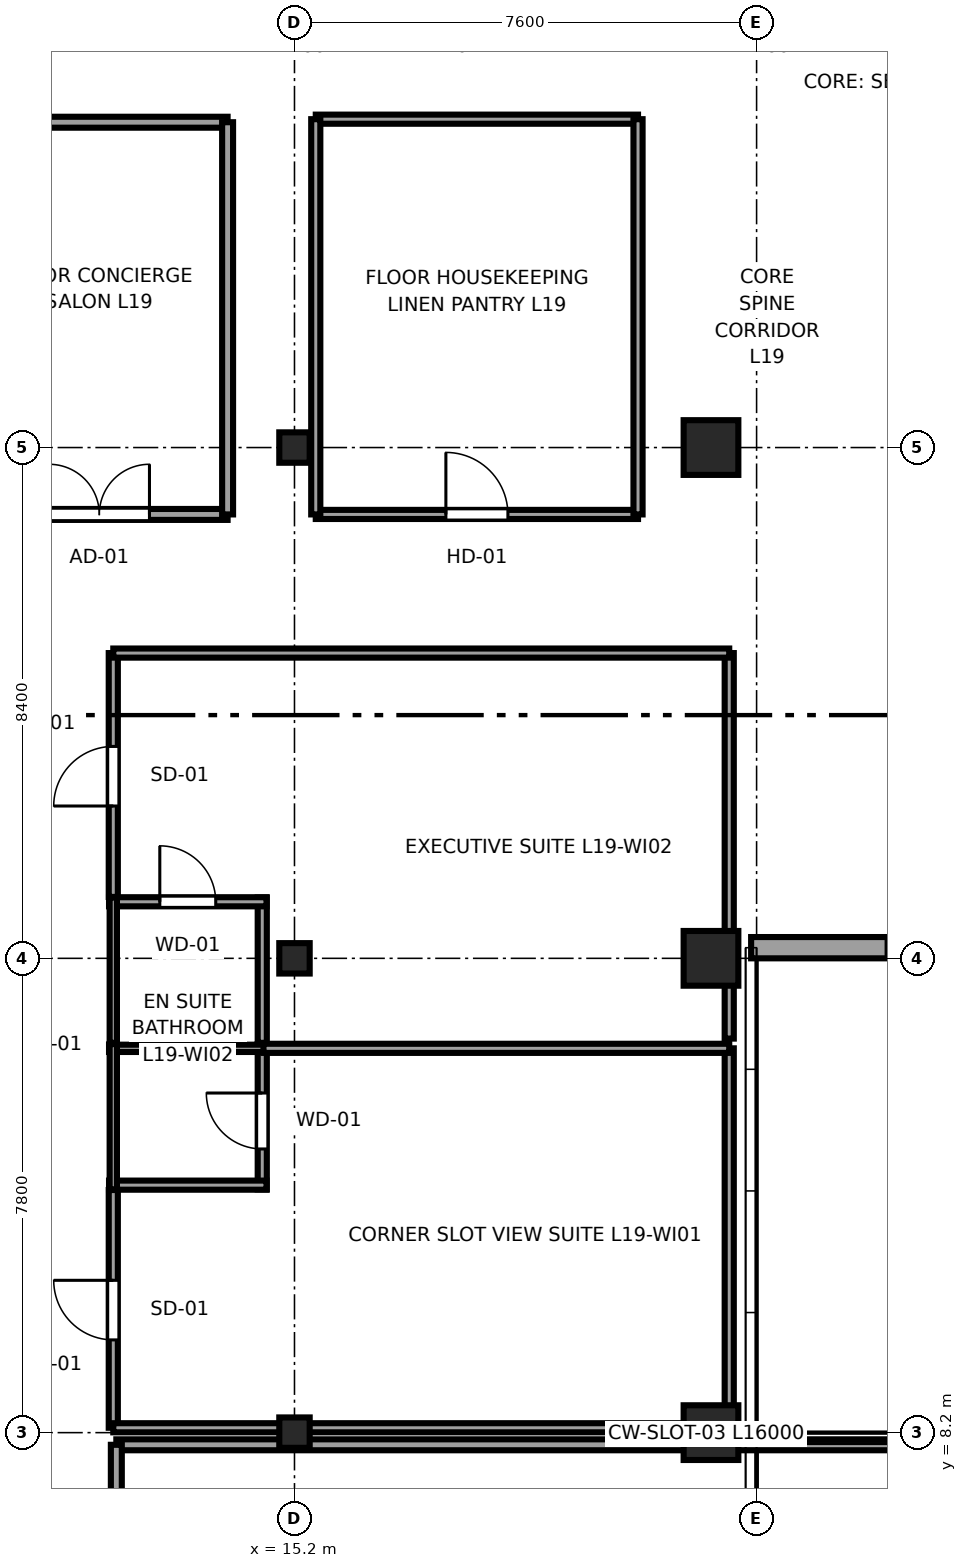
"""IFC4 building model, lengths in metres.
Left out: names, types, materials, properties, quantities, classifications, styles, units other than length and angle.
Written with IfcOpenShell. Run it as: python <this file> out.ifc"""

import sys

from ifc_helpers import new_model, si_unit, direction, frame, frame_2d, origin, origin_2d, place, context, subcontext, project, spatial, rectangle, i_section, extrude, source, transform, mapped, element, fill, save


model = new_model("IFC4")
c1 = context("Model", 3, precision=1e-05, world=origin(), true_north=direction((0.0, 1.0)))
c2 = subcontext(c1, "Body", "Model", "MODEL_VIEW")
j1 = project(units=[si_unit("LENGTHUNIT", "METRE"), si_unit("PLANEANGLEUNIT", "RADIAN")], contexts=[c1])
p1 = place(None, origin())
s1 = spatial("IfcSite", under=j1, at=p1, CompositionType="ELEMENT")
p2 = place(p1, origin())
s2 = spatial("IfcBuilding", under=s1, at=p2, CompositionType="ELEMENT")
p3 = place(p2, frame((0.0, 0.0, 78.15)))
s3 = spatial("IfcBuildingStorey", under=s2, at=p3, CompositionType="ELEMENT", Elevation=78.15)
m1 = source(origin(), c2, "Body", "SweptSolid", [
    extrude(i_section(OverallWidth=0.5, OverallDepth=0.5, WebThickness=0.022, FlangeThickness=0.034, at=origin_2d()), origin(), (0.0, 0.0, 1.0), 3.55),
])
for number, where, z_axis, x_axis in (
    (1, (15.2, 8.2, 0.0), (0.0, 0.0, 1.0), (1.0, 0.0, 0.0)),
    (2, (15.2, 16.0, 0.0), (0.0, 0.0, 1.0), (1.0, 0.0, 0.0)),
    (3, (15.2, 24.4, 0.0), (0.0, 0.0, 1.0), (1.0, 0.0, 0.0)),
):
    element("IfcColumn", number, at=place(p3, frame(where, z_axis=z_axis, x_axis=x_axis)), inside=s3, PredefinedType="COLUMN", context=c2, shape_type="MappedRepresentation", body=[
        mapped(m1, transform((0.0, 0.0, 0.0), x_axis=(1.0, 0.0, 0.0), y_axis=(0.0, 1.0, 0.0), z_axis=(0.0, 0.0, 1.0), scale=1.0)),
    ])
m2 = source(origin(), c2, "Body", "SweptSolid", [
    extrude(rectangle(XDim=0.9, YDim=0.9, at=origin_2d()), origin(), (0.0, 0.0, 1.0), 3.55),
])
for number, where, z_axis, x_axis in (
    (4, (22.05, 8.2, 0.0), (0.0, 0.0, 1.0), (1.0, 0.0, 0.0)),
    (5, (22.05, 16.0, 0.0), (0.0, 0.0, 1.0), (1.0, 0.0, 0.0)),
    (6, (22.05, 24.4, 0.0), (0.0, 0.0, 1.0), (1.0, 0.0, 0.0)),
):
    element("IfcColumn", number, at=place(p3, frame(where, z_axis=z_axis, x_axis=x_axis)), inside=s3, PredefinedType="COLUMN", context=c2, shape_type="MappedRepresentation", body=[
        mapped(m2, transform((0.0, 0.0, 0.0), x_axis=(1.0, 0.0, 0.0), y_axis=(0.0, 1.0, 0.0), z_axis=(0.0, 0.0, 1.0), scale=1.0)),
    ])
p4 = place(p3, frame((22.71, 16.175, 0.0), z_axis=(0.0, 0.0, 1.0), x_axis=(1.0, 0.0, 0.0)))
e7 = element("IfcWall", 7, at=p4, inside=s3, PredefinedType="SOLIDWALL", context=c2, shape_type="SweptSolid", body=[
    extrude(rectangle(XDim=11.58, YDim=0.35, at=frame_2d((5.79, 0.0))), origin(), (0.0, 0.0, 1.0), 2.748),
])
p5 = place(p4, frame((2.22, 0.0, 0.68)))
e8 = element("IfcOpeningElement", 8, at=p5, cuts=e7, PredefinedType="OPENING", context=c2, shape_type="SweptSolid", body=[
    extrude(rectangle(XDim=1.95, YDim=1.82, at=frame_2d((0.975, 0.91))), frame((0.0, 0.185, 0.0), z_axis=(0.0, -1.0, 0.0), x_axis=(1.0, 0.0, 0.0)), (0.0, 0.0, 1.0), 0.37),
])
p6 = place(p4, frame((7.41, 0.0, 0.68)))
e9 = element("IfcOpeningElement", 9, at=p6, cuts=e7, PredefinedType="OPENING", context=c2, shape_type="SweptSolid", body=[
    extrude(rectangle(XDim=1.95, YDim=1.82, at=frame_2d((0.975, 0.91))), frame((0.0, 0.185, 0.0), z_axis=(0.0, -1.0, 0.0), x_axis=(1.0, 0.0, 0.0)), (0.0, 0.0, 1.0), 0.37),
])
p7 = place(p3, frame((14.67, 12.2, 0.0), z_axis=(0.0, 0.0, 1.0), x_axis=(0.0, 1.0, 0.0)))
e10 = element("IfcWall", 10, at=p7, inside=s3, PredefinedType="PARTITIONING", context=c2, shape_type="SweptSolid", body=[
    extrude(rectangle(XDim=2.39, YDim=0.15, at=frame_2d((1.195, 0.0))), origin(), (0.0, 0.0, 1.0), 3.37),
])
p8 = place(p7, frame((0.665, 0.0, 0.0)))
e11 = element("IfcOpeningElement", 11, at=p8, cuts=e10, PredefinedType="OPENING", context=c2, shape_type="SweptSolid", body=[
    extrude(rectangle(XDim=0.92, YDim=2.01, at=frame_2d((0.46, 1.005))), frame((0.0, 0.085, 0.0), z_axis=(0.0, -1.0, 0.0), x_axis=(1.0, 0.0, 0.0)), (0.0, 0.0, 1.0), 0.17),
])
p9 = place(p3, frame((12.15, 12.27, 0.0), z_axis=(0.0, 0.0, 1.0), x_axis=(1.0, 0.0, 0.0)))
e12 = element("IfcWall", 12, at=p9, inside=s3, PredefinedType="PARTITIONING", context=c2, shape_type="SweptSolid", body=[
    extrude(rectangle(XDim=2.59, YDim=0.15, at=frame_2d((1.295, 0.0))), origin(), (0.0, 0.0, 1.0), 3.37),
])
p10 = place(p3, frame((12.15, 14.52, 0.0), z_axis=(0.0, 0.0, 1.0), x_axis=(1.0, 0.0, 0.0)))
e13 = element("IfcWall", 13, at=p10, inside=s3, PredefinedType="PLUMBINGWALL", context=c2, shape_type="SweptSolid", body=[
    extrude(rectangle(XDim=2.59, YDim=0.12, at=frame_2d((1.295, 0.0))), origin(), (0.0, 0.0, 1.0), 3.37),
])
p11 = place(p3, frame((12.22, 12.2, 0.0), z_axis=(0.0, 0.0, 1.0), x_axis=(0.0, 1.0, 0.0)))
e14 = element("IfcWall", 14, at=p11, inside=s3, PredefinedType="PLUMBINGWALL", context=c2, shape_type="SweptSolid", body=[
    extrude(rectangle(XDim=2.39, YDim=0.12, at=frame_2d((1.195, 0.0))), origin(), (0.0, 0.0, 1.0), 3.37),
])
p12 = place(p3, frame((14.67, 14.61, 0.0), z_axis=(0.0, 0.0, 1.0), x_axis=(0.0, 1.0, 0.0)))
e15 = element("IfcWall", 15, at=p12, inside=s3, PredefinedType="PARTITIONING", context=c2, shape_type="SweptSolid", body=[
    extrude(rectangle(XDim=2.39, YDim=0.15, at=frame_2d((1.195, 0.0))), origin(), (0.0, 0.0, 1.0), 3.37),
])
p13 = place(p3, frame((12.15, 16.93, 0.0), z_axis=(0.0, 0.0, 1.0), x_axis=(1.0, 0.0, 0.0)))
e16 = element("IfcWall", 16, at=p13, inside=s3, PredefinedType="PARTITIONING", context=c2, shape_type="SweptSolid", body=[
    extrude(rectangle(XDim=2.59, YDim=0.15, at=frame_2d((1.295, 0.0))), origin(), (0.0, 0.0, 1.0), 3.37),
])
p14 = place(p13, frame((0.835, 0.0, 0.0)))
e17 = element("IfcOpeningElement", 17, at=p14, cuts=e16, PredefinedType="OPENING", context=c2, shape_type="SweptSolid", body=[
    extrude(rectangle(XDim=0.92, YDim=2.01, at=frame_2d((0.46, 1.005))), frame((0.0, 0.085, 0.0), z_axis=(0.0, -1.0, 0.0), x_axis=(1.0, 0.0, 0.0)), (0.0, 0.0, 1.0), 0.17),
])
p15 = place(p3, frame((12.22, 14.61, 0.0), z_axis=(0.0, 0.0, 1.0), x_axis=(0.0, 1.0, 0.0)))
e18 = element("IfcWall", 18, at=p15, inside=s3, PredefinedType="PLUMBINGWALL", context=c2, shape_type="SweptSolid", body=[
    extrude(rectangle(XDim=2.39, YDim=0.12, at=frame_2d((1.195, 0.0))), origin(), (0.0, 0.0, 1.0), 3.37),
])
p16 = place(p3, frame((12.22, 8.28, 0.0), z_axis=(0.0, 0.0, 1.0), x_axis=(0.0, 1.0, 0.0)))
e19 = element("IfcWall", 19, at=p16, inside=s3, PredefinedType="PARTITIONING", context=c2, shape_type="SweptSolid", body=[
    extrude(rectangle(XDim=3.91, YDim=0.15, at=frame_2d((1.955, 0.0))), origin(), (0.0, 0.0, 1.0), 3.37),
])
p17 = place(p16, frame((1.445, 0.0, 0.0)))
e20 = element("IfcOpeningElement", 20, at=p17, cuts=e19, PredefinedType="OPENING", context=c2, shape_type="SweptSolid", body=[
    extrude(rectangle(XDim=0.98, YDim=2.12, at=frame_2d((0.49, 1.06))), frame((0.0, 0.085, 0.0), z_axis=(0.0, -1.0, 0.0), x_axis=(1.0, 0.0, 0.0)), (0.0, 0.0, 1.0), 0.17),
])
p18 = place(p3, frame((12.22, 8.28, 0.0), z_axis=(0.0, 0.0, 1.0), x_axis=(1.0, 0.0, 0.0)))
e21 = element("IfcWall", 21, at=p18, inside=s3, PredefinedType="PARTITIONING", context=c2, shape_type="SweptSolid", body=[
    extrude(rectangle(XDim=10.13, YDim=0.15, at=frame_2d((5.065, 0.0))), origin(), (0.0, 0.0, 1.0), 2.748),
])
p19 = place(p3, frame((22.35, 8.28, 0.0), z_axis=(0.0, 0.0, 1.0), x_axis=(0.0, 1.0, 0.0)))
e22 = element("IfcWall", 22, at=p19, inside=s3, PredefinedType="PARTITIONING", context=c2, shape_type="SweptSolid", body=[
    extrude(rectangle(XDim=6.24, YDim=0.15, at=frame_2d((3.12, 0.0))), origin(), (0.0, 0.0, 1.0), 3.37),
])
p20 = place(p3, frame((14.69, 14.52, 0.0), z_axis=(0.0, 0.0, 1.0), x_axis=(1.0, 0.0, 0.0)))
e23 = element("IfcWall", 23, at=p20, inside=s3, PredefinedType="PARTITIONING", context=c2, shape_type="SweptSolid", body=[
    extrude(rectangle(XDim=7.66, YDim=0.15, at=frame_2d((3.83, 0.0))), origin(), (0.0, 0.0, 1.0), 3.37),
])
p21 = place(p3, frame((12.22, 17.01, 0.0), z_axis=(0.0, 0.0, 1.0), x_axis=(0.0, 1.0, 0.0)))
e24 = element("IfcWall", 24, at=p21, inside=s3, PredefinedType="PARTITIONING", context=c2, shape_type="SweptSolid", body=[
    extrude(rectangle(XDim=4.01, YDim=0.15, at=frame_2d((2.005, 0.0))), origin(), (0.0, 0.0, 1.0), 3.37),
])
p22 = place(p21, frame((1.495, 0.0, 0.0)))
e25 = element("IfcOpeningElement", 25, at=p22, cuts=e24, PredefinedType="OPENING", context=c2, shape_type="SweptSolid", body=[
    extrude(rectangle(XDim=0.98, YDim=2.12, at=frame_2d((0.49, 1.06))), frame((0.0, 0.085, 0.0), z_axis=(0.0, -1.0, 0.0), x_axis=(1.0, 0.0, 0.0)), (0.0, 0.0, 1.0), 0.17),
])
p23 = place(p3, frame((22.35, 14.68, 0.0), z_axis=(0.0, 0.0, 1.0), x_axis=(0.0, 1.0, 0.0)))
e26 = element("IfcWall", 26, at=p23, inside=s3, PredefinedType="PARTITIONING", context=c2, shape_type="SweptSolid", body=[
    extrude(rectangle(XDim=6.34, YDim=0.15, at=frame_2d((3.17, 0.0))), origin(), (0.0, 0.0, 1.0), 3.37),
])
p24 = place(p3, frame((12.22, 21.02, 0.0), z_axis=(0.0, 0.0, 1.0), x_axis=(1.0, 0.0, 0.0)))
e27 = element("IfcWall", 27, at=p24, inside=s3, PredefinedType="PARTITIONING", context=c2, shape_type="SweptSolid", body=[
    extrude(rectangle(XDim=10.13, YDim=0.15, at=frame_2d((5.065, 0.0))), origin(), (0.0, 0.0, 1.0), 3.37),
])
p25 = place(p3, frame((9.88, 23.3, 0.0), z_axis=(0.0, 0.0, 1.0), x_axis=(1.0, 0.0, 0.0)))
e28 = element("IfcWall", 28, at=p25, inside=s3, PredefinedType="PARTITIONING", context=c2, shape_type="SweptSolid", body=[
    extrude(rectangle(XDim=4.22, YDim=0.18, at=frame_2d((2.11, 0.0))), origin(), (0.0, 0.0, 1.0), 3.37),
])
p26 = place(p25, frame((1.285, 0.0, 0.0)))
e29 = element("IfcOpeningElement", 29, at=p26, cuts=e28, PredefinedType="OPENING", context=c2, shape_type="SweptSolid", body=[
    extrude(rectangle(XDim=1.65, YDim=2.15, at=frame_2d((0.825, 1.075))), frame((0.0, 0.1, 0.0), z_axis=(0.0, -1.0, 0.0), x_axis=(1.0, 0.0, 0.0)), (0.0, 0.0, 1.0), 0.2),
])
p27 = place(p3, frame((9.88, 29.75, 0.0), z_axis=(0.0, 0.0, 1.0), x_axis=(1.0, 0.0, 0.0)))
e30 = element("IfcWall", 30, at=p27, inside=s3, PredefinedType="PARTITIONING", context=c2, shape_type="SweptSolid", body=[
    extrude(rectangle(XDim=4.22, YDim=0.18, at=frame_2d((2.11, 0.0))), origin(), (0.0, 0.0, 1.0), 3.37),
])
p28 = place(p3, frame((14.1, 23.3, 0.0), z_axis=(0.0, 0.0, 1.0), x_axis=(0.0, 1.0, 0.0)))
e31 = element("IfcWall", 31, at=p28, inside=s3, PredefinedType="PARTITIONING", context=c2, shape_type="SweptSolid", body=[
    extrude(rectangle(XDim=6.45, YDim=0.18, at=frame_2d((3.225, 0.0))), origin(), (0.0, 0.0, 1.0), 3.37),
])
p29 = place(p3, frame((15.55, 23.3, 0.0), z_axis=(0.0, 0.0, 1.0), x_axis=(1.0, 0.0, 0.0)))
e32 = element("IfcWall", 32, at=p29, inside=s3, PredefinedType="PARTITIONING", context=c2, shape_type="SweptSolid", body=[
    extrude(rectangle(XDim=5.3, YDim=0.15, at=frame_2d((2.65, 0.0))), origin(), (0.0, 0.0, 1.0), 3.37),
])
p30 = place(p29, frame((2.14, 0.0, 0.0)))
e33 = element("IfcOpeningElement", 33, at=p30, cuts=e32, PredefinedType="OPENING", context=c2, shape_type="SweptSolid", body=[
    extrude(rectangle(XDim=1.02, YDim=2.03, at=frame_2d((0.51, 1.015))), frame((0.0, 0.085, 0.0), z_axis=(0.0, -1.0, 0.0), x_axis=(1.0, 0.0, 0.0)), (0.0, 0.0, 1.0), 0.17),
])
p31 = place(p3, frame((15.55, 29.8, 0.0), z_axis=(0.0, 0.0, 1.0), x_axis=(1.0, 0.0, 0.0)))
e34 = element("IfcWall", 34, at=p31, inside=s3, PredefinedType="PARTITIONING", context=c2, shape_type="SweptSolid", body=[
    extrude(rectangle(XDim=5.3, YDim=0.15, at=frame_2d((2.65, 0.0))), origin(), (0.0, 0.0, 1.0), 3.37),
])
for number, where, z_axis, x_axis in (
    (35, (15.55, 23.3, 0.0), (0.0, 0.0, 1.0), (0.0, 1.0, 0.0)),
    (36, (20.85, 23.3, 0.0), (0.0, 0.0, 1.0), (0.0, 1.0, 0.0)),
):
    element("IfcWall", number, at=place(p3, frame(where, z_axis=z_axis, x_axis=x_axis)), inside=s3, PredefinedType="PARTITIONING", context=c2, shape_type="SweptSolid", body=[
        extrude(rectangle(XDim=6.5, YDim=0.15, at=frame_2d((3.25, 0.0))), origin(), (0.0, 0.0, 1.0), 3.37),
    ])
p32 = place(p3, frame((12.27, 8.0, 0.0), z_axis=(0.0, 0.0, 1.0), x_axis=(1.0, 0.0, 0.0)))
e37 = element("IfcWall", 37, at=p32, inside=s3, PredefinedType="PARTITIONING", context=c2, shape_type="SweptSolid", body=[
    extrude(rectangle(XDim=34.01, YDim=0.18, at=frame_2d((17.005, 0.0))), origin(), (0.0, 0.0, 1.0), 3.37),
])
p33 = place(p3, frame((12.27, 2.6, 0.0), z_axis=(0.0, 0.0, 1.0), x_axis=(0.0, 1.0, 0.0)))
e38 = element("IfcWall", 38, at=p33, inside=s3, PredefinedType="PARTITIONING", context=c2, shape_type="SweptSolid", body=[
    extrude(rectangle(XDim=5.4, YDim=0.18, at=frame_2d((2.7, 0.0))), origin(), (0.0, 0.0, 1.0), 3.37),
])
p34 = place(p33, frame((1.875, 0.0, 0.0)))
e39 = element("IfcOpeningElement", 39, at=p34, cuts=e38, PredefinedType="OPENING", context=c2, shape_type="SweptSolid", body=[
    extrude(rectangle(XDim=1.65, YDim=2.15, at=frame_2d((0.825, 1.075))), frame((0.0, 0.1, 0.0), z_axis=(0.0, -1.0, 0.0), x_axis=(1.0, 0.0, 0.0)), (0.0, 0.0, 1.0), 0.2),
])
m3 = source(origin(), c2, "Body", "SweptSolid", [
    extrude(rectangle(XDim=1.95, YDim=1.82, at=frame_2d((0.975, 0.91))), frame((0.0, 0.09, 0.0), z_axis=(0.0, -1.0, 0.0), x_axis=(1.0, 0.0, 0.0)), (0.0, 0.0, 1.0), 0.06),
])
p35 = place(p5, origin())
e40 = element("IfcWindow", 40, at=p35, inside=s3, PartitioningType="DOUBLE_PANEL_VERTICAL", PredefinedType="WINDOW", context=c2, shape_type="MappedRepresentation", body=[
    mapped(m3, transform((0.0, 0.0, 0.0), x_axis=(1.0, 0.0, 0.0), y_axis=(0.0, 1.0, 0.0), z_axis=(0.0, 0.0, 1.0), scale=1.0)),
])
fill(e8, e40)
m4 = source(origin(), c2, "Body", "SweptSolid", [
    extrude(rectangle(XDim=0.92, YDim=2.01, at=frame_2d((0.46, 1.005))), frame((0.0, 0.025, 0.0), z_axis=(0.0, -1.0, 0.0), x_axis=(1.0, 0.0, 0.0)), (0.0, 0.0, 1.0), 0.05),
])
p36 = place(p8, origin())
e41 = element("IfcDoor", 41, at=p36, inside=s3, OperationType="SINGLE_SWING_RIGHT", PredefinedType="DOOR", context=c2, shape_type="MappedRepresentation", body=[
    mapped(m4, transform((0.0, 0.0, 0.0), x_axis=(1.0, 0.0, 0.0), y_axis=(0.0, 1.0, 0.0), z_axis=(0.0, 0.0, 1.0), scale=1.0)),
])
fill(e11, e41)
p37 = place(p14, origin())
e42 = element("IfcDoor", 42, at=p37, inside=s3, OperationType="SINGLE_SWING_LEFT", PredefinedType="DOOR", context=c2, shape_type="MappedRepresentation", body=[
    mapped(m4, transform((0.0, 0.0, 0.0), x_axis=(1.0, 0.0, 0.0), y_axis=(0.0, 1.0, 0.0), z_axis=(0.0, 0.0, 1.0), scale=1.0)),
])
fill(e17, e42)
m5 = source(origin(), c2, "Body", "SweptSolid", [
    extrude(rectangle(XDim=0.98, YDim=2.12, at=frame_2d((0.49, 1.06))), frame((0.0, 0.025, 0.0), z_axis=(0.0, -1.0, 0.0), x_axis=(1.0, 0.0, 0.0)), (0.0, 0.0, 1.0), 0.05),
])
p38 = place(p17, origin())
e43 = element("IfcDoor", 43, at=p38, inside=s3, OperationType="SINGLE_SWING_RIGHT", PredefinedType="DOOR", context=c2, shape_type="MappedRepresentation", body=[
    mapped(m5, transform((0.0, 0.0, 0.0), x_axis=(1.0, 0.0, 0.0), y_axis=(0.0, 1.0, 0.0), z_axis=(0.0, 0.0, 1.0), scale=1.0)),
])
fill(e20, e43)
p39 = place(p22, origin())
e44 = element("IfcDoor", 44, at=p39, inside=s3, OperationType="SINGLE_SWING_LEFT", PredefinedType="DOOR", context=c2, shape_type="MappedRepresentation", body=[
    mapped(m5, transform((0.0, 0.0, 0.0), x_axis=(1.0, 0.0, 0.0), y_axis=(0.0, 1.0, 0.0), z_axis=(0.0, 0.0, 1.0), scale=1.0)),
])
fill(e25, e44)
m6 = source(origin(), c2, "Body", "SweptSolid", [
    extrude(rectangle(XDim=1.65, YDim=2.15, at=frame_2d((0.825, 1.075))), frame((0.0, 0.025, 0.0), z_axis=(0.0, -1.0, 0.0), x_axis=(1.0, 0.0, 0.0)), (0.0, 0.0, 1.0), 0.05),
])
p40 = place(p26, origin())
e45 = element("IfcDoor", 45, at=p40, inside=s3, OperationType="DOUBLE_DOOR_SINGLE_SWING", PredefinedType="DOOR", context=c2, shape_type="MappedRepresentation", body=[
    mapped(m6, transform((0.0, 0.0, 0.0), x_axis=(1.0, 0.0, 0.0), y_axis=(0.0, 1.0, 0.0), z_axis=(0.0, 0.0, 1.0), scale=1.0)),
])
fill(e29, e45)
m7 = source(origin(), c2, "Body", "SweptSolid", [
    extrude(rectangle(XDim=1.02, YDim=2.03, at=frame_2d((0.51, 1.015))), frame((0.0, 0.025, 0.0), z_axis=(0.0, -1.0, 0.0), x_axis=(1.0, 0.0, 0.0)), (0.0, 0.0, 1.0), 0.05),
])
p41 = place(p30, origin())
e46 = element("IfcDoor", 46, at=p41, inside=s3, OperationType="SINGLE_SWING_LEFT", PredefinedType="DOOR", context=c2, shape_type="MappedRepresentation", body=[
    mapped(m7, transform((0.0, 0.0, 0.0), x_axis=(1.0, 0.0, 0.0), y_axis=(0.0, 1.0, 0.0), z_axis=(0.0, 0.0, 1.0), scale=1.0)),
])
fill(e33, e46)
save(model, sys.argv[1])
